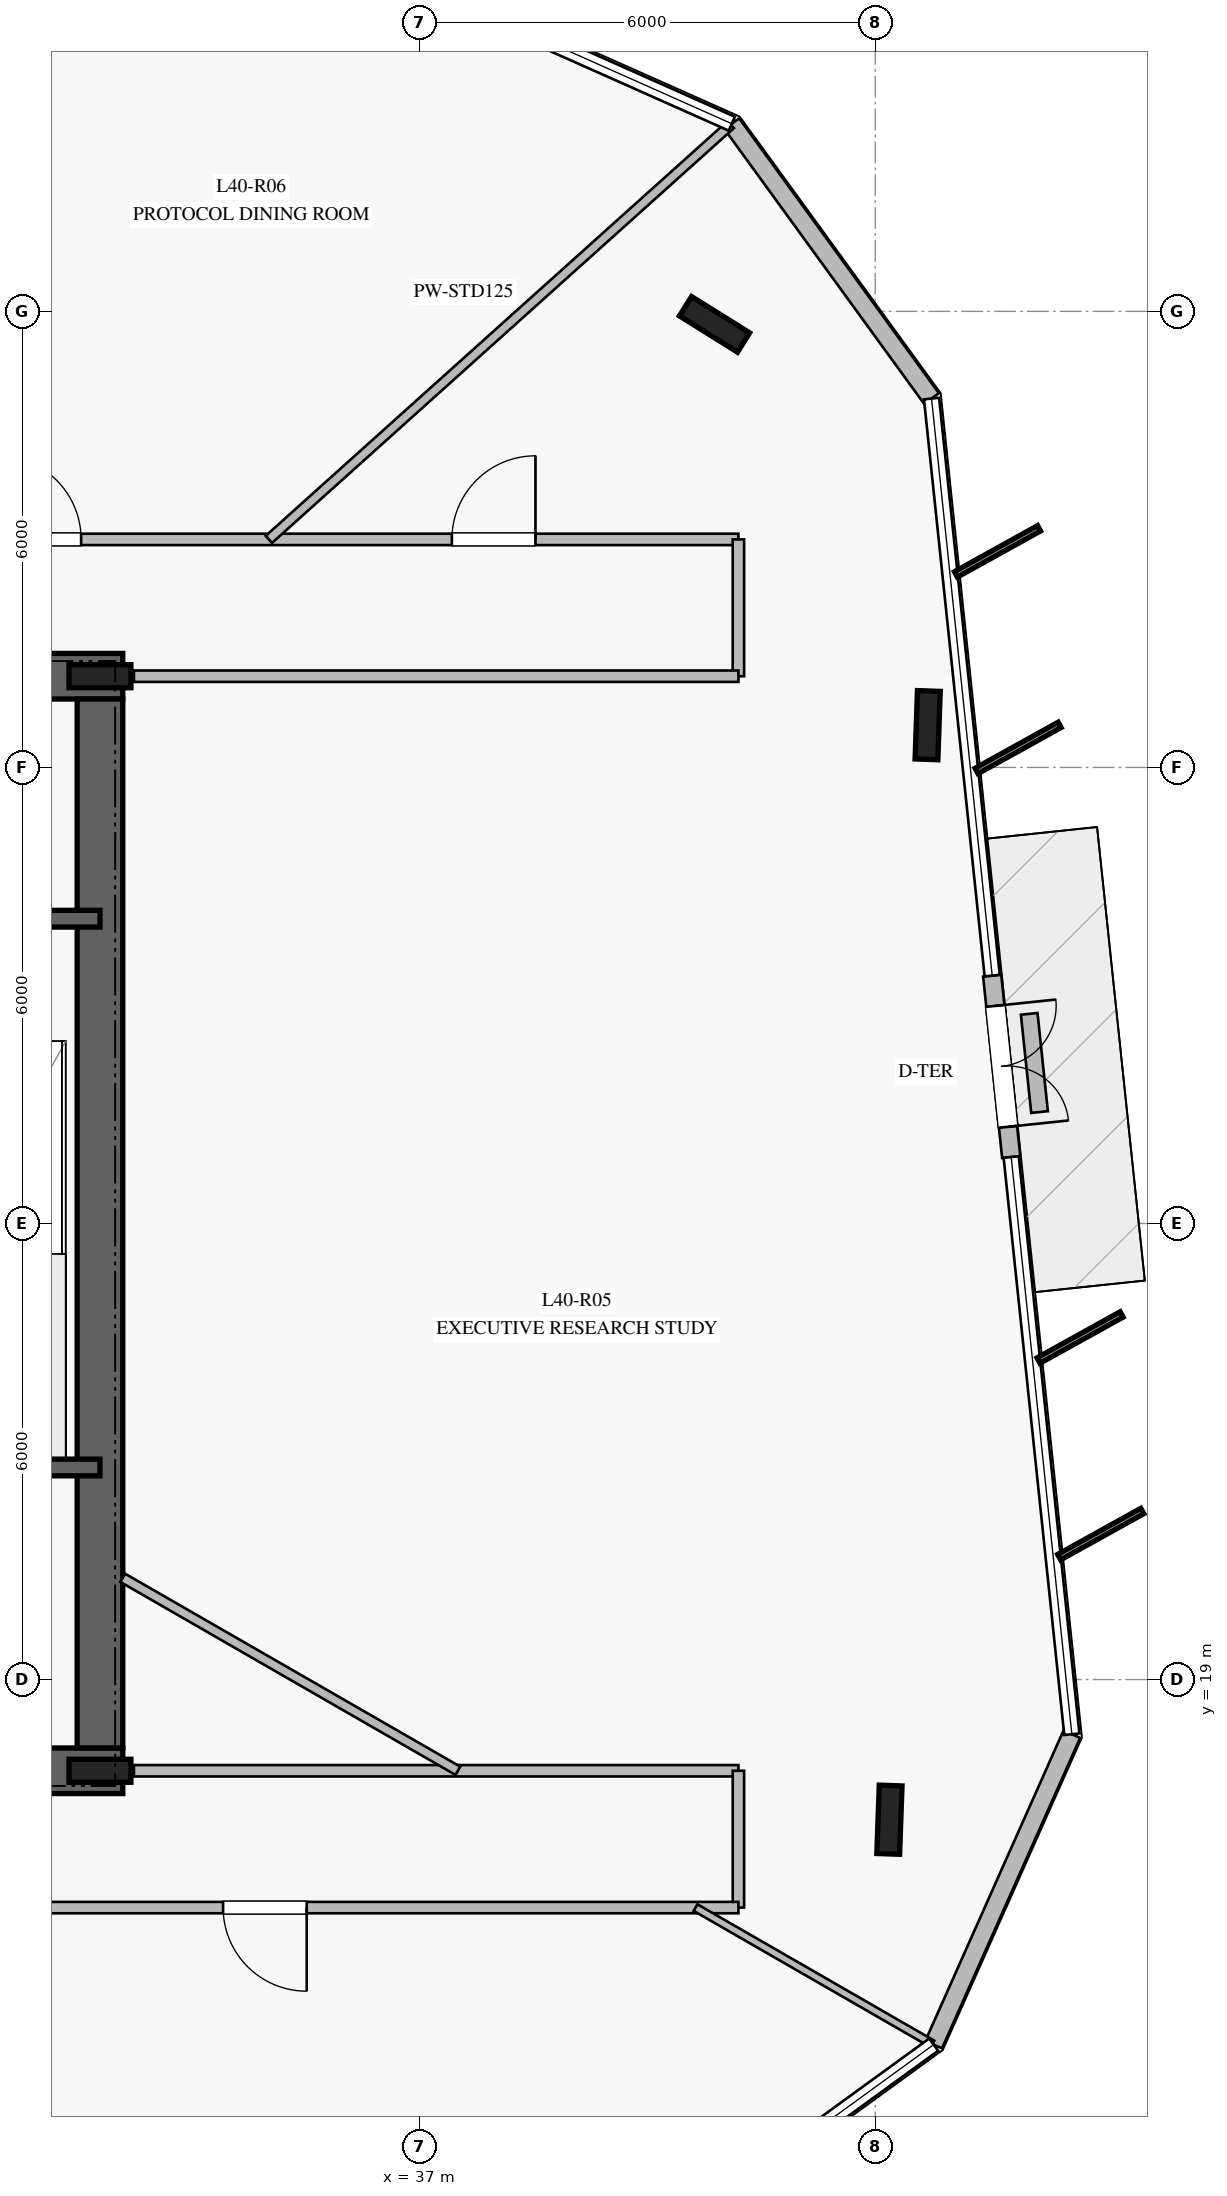
"""IFC4 building model, lengths in metres.
Left out: names, types, materials, properties, quantities, classifications, styles, units other than length and angle.
Written with IfcOpenShell. Run it as: python <this file> out.ifc"""

import sys

from ifc_helpers import new_model, si_unit, direction, frame, frame_2d, origin, origin_2d, place, context, subcontext, project, spatial, rectangle, i_section, extrude, element, fill, save


model = new_model("IFC4")
c1 = context("Model", 3, precision=1e-05, world=origin(), true_north=direction((0.0, 1.0)))
c2 = subcontext(c1, "Body", "Model", "MODEL_VIEW")
j1 = project(units=[si_unit("LENGTHUNIT", "METRE"), si_unit("PLANEANGLEUNIT", "RADIAN")], contexts=[c1])
p1 = place(None, origin())
s1 = spatial("IfcSite", under=j1, at=p1, CompositionType="ELEMENT")
p2 = place(p1, origin())
s2 = spatial("IfcBuilding", under=s1, at=p2, CompositionType="ELEMENT")
p3 = place(p2, frame((0.0, 0.0, 166.4)))
s3 = spatial("IfcBuildingStorey", under=s2, at=p3, CompositionType="ELEMENT", Elevation=166.4)
p4 = place(p3, frame((16.9, 17.8, 0.0), z_axis=(0.0, 0.0, 1.0), x_axis=(1.0, 0.0, 0.0)))
e1 = element("IfcWall", 1, at=p4, inside=s3, PredefinedType="SHEAR", context=c2, shape_type="SweptSolid", body=[
    extrude(rectangle(XDim=16.2, YDim=0.6, at=frame_2d((8.1, 0.0))), origin(), (0.0, 0.0, 1.0), 3.7),
])
p5 = place(p4, frame((5.05, 0.0, 0.0)))
e2 = element("IfcOpeningElement", 2, at=p5, cuts=e1, PredefinedType="OPENING", context=c2, shape_type="SweptSolid", body=[
    extrude(rectangle(XDim=1.2, YDim=2.25, at=frame_2d((0.6, 1.125))), frame((0.0, 0.31, 0.0), z_axis=(0.0, -1.0, 0.0), x_axis=(1.0, 0.0, 0.0)), (0.0, 0.0, 1.0), 0.62),
])
p6 = place(p4, frame((14.0, 0.0, 0.0)))
e3 = element("IfcOpeningElement", 3, at=p6, cuts=e1, PredefinedType="OPENING", context=c2, shape_type="SweptSolid", body=[
    extrude(rectangle(XDim=0.9, YDim=2.1, at=frame_2d((0.45, 1.05))), frame((0.0, 0.31, 0.0), z_axis=(0.0, -1.0, 0.0), x_axis=(1.0, 0.0, 0.0)), (0.0, 0.0, 1.0), 0.62),
])
p7 = place(p4, frame((9.875, 0.0, 0.0)))
e4 = element("IfcOpeningElement", 4, at=p7, cuts=e1, PredefinedType="OPENING", context=c2, shape_type="SweptSolid", body=[
    extrude(rectangle(XDim=1.1, YDim=2.2, at=frame_2d((0.55, 1.1))), frame((0.0, 0.31, 0.0), z_axis=(0.0, -1.0, 0.0), x_axis=(1.0, 0.0, 0.0)), (0.0, 0.0, 1.0), 0.62),
])
p8 = place(p3, frame((33.1, 32.2, 0.0), z_axis=(0.0, 0.0, 1.0), x_axis=(-1.0, 0.0, 0.0)))
e5 = element("IfcWall", 5, at=p8, inside=s3, PredefinedType="SHEAR", context=c2, shape_type="SweptSolid", body=[
    extrude(rectangle(XDim=16.2, YDim=0.6, at=frame_2d((8.1, 0.0))), origin(), (0.0, 0.0, 1.0), 3.7),
])
p9 = place(p8, frame((5.05, 0.0, 0.0)))
e6 = element("IfcOpeningElement", 6, at=p9, cuts=e5, PredefinedType="OPENING", context=c2, shape_type="SweptSolid", body=[
    extrude(rectangle(XDim=1.2, YDim=2.25, at=frame_2d((0.6, 1.125))), frame((0.0, 0.31, 0.0), z_axis=(0.0, -1.0, 0.0), x_axis=(1.0, 0.0, 0.0)), (0.0, 0.0, 1.0), 0.62),
])
p10 = place(p8, frame((11.85, 0.0, 0.0)))
e7 = element("IfcOpeningElement", 7, at=p10, cuts=e5, PredefinedType="OPENING", context=c2, shape_type="SweptSolid", body=[
    extrude(rectangle(XDim=1.1, YDim=2.2, at=frame_2d((0.55, 1.1))), frame((0.0, 0.31, 0.0), z_axis=(0.0, -1.0, 0.0), x_axis=(1.0, 0.0, 0.0)), (0.0, 0.0, 1.0), 0.62),
])
p11 = place(p8, frame((9.875, 0.0, 0.0)))
e8 = element("IfcOpeningElement", 8, at=p11, cuts=e5, PredefinedType="OPENING", context=c2, shape_type="SweptSolid", body=[
    extrude(rectangle(XDim=1.1, YDim=2.2, at=frame_2d((0.55, 1.1))), frame((0.0, 0.31, 0.0), z_axis=(0.0, -1.0, 0.0), x_axis=(1.0, 0.0, 0.0)), (0.0, 0.0, 1.0), 0.62),
])
p12 = place(p8, frame((7.9, 0.0, 0.0)))
e9 = element("IfcOpeningElement", 9, at=p12, cuts=e5, PredefinedType="OPENING", context=c2, shape_type="SweptSolid", body=[
    extrude(rectangle(XDim=1.1, YDim=2.2, at=frame_2d((0.55, 1.1))), frame((0.0, 0.31, 0.0), z_axis=(0.0, -1.0, 0.0), x_axis=(1.0, 0.0, 0.0)), (0.0, 0.0, 1.0), 0.62),
])
p13 = place(p3, frame((32.8, 18.1, 0.0), z_axis=(0.0, 0.0, 1.0), x_axis=(0.0, 1.0, 0.0)))
e10 = element("IfcWall", 10, at=p13, inside=s3, PredefinedType="SHEAR", context=c2, shape_type="SweptSolid", body=[
    extrude(rectangle(XDim=13.8, YDim=0.6, at=frame_2d((6.9, 0.0))), origin(), (0.0, 0.0, 1.0), 3.7),
])
for number, where, z_axis, x_axis in (
    (11, (32.8, 17.8, 0.0), (0.0, 0.0, 1.0), (1.0, 0.0, 0.0)),
    (12, (32.8, 32.2, 0.0), (0.0, 0.0, 1.0), (1.0, 0.0, 0.0)),
):
    element("IfcColumn", number, at=place(p3, frame(where, z_axis=z_axis, x_axis=x_axis)), inside=s3, PredefinedType="COLUMN", context=c2, shape_type="SweptSolid", body=[
        extrude(i_section(OverallWidth=0.303, OverallDepth=0.814, WebThickness=0.021, FlangeThickness=0.04, at=origin_2d()), origin(), (0.0, 0.0, 1.0), 4.0),
    ])
for number, where, z_axis, x_axis in (
    (13, (29.08, 21.79, 0.0), (0.0, 0.0, 1.0), (1.0, 0.0, 0.0)),
    (14, (29.08, 29.01, 0.0), (0.0, 0.0, 1.0), (1.0, 0.0, 0.0)),
):
    element("IfcWall", number, at=place(p3, frame(where, z_axis=z_axis, x_axis=x_axis)), inside=s3, PredefinedType="SOLIDWALL", context=c2, shape_type="SweptSolid", body=[
        extrude(rectangle(XDim=3.72, YDim=0.22, at=frame_2d((1.86, 0.0))), origin(), (0.0, 0.0, 1.0), 3.7),
    ])
for number, where, z_axis, x_axis in (
    (15, (40.886, 36.829, 0.0), (0.0, 0.0, 1.0), (-0.848, 0.53, 0.0)),
    (16, (43.187, 17.156, 0.0), (0.0, 0.0, 1.0), (0.035, 0.999, 0.0)),
    (17, (43.69, 31.556, 0.0), (0.0, 0.0, 1.0), (0.035, 0.999, 0.0)),
):
    element("IfcColumn", number, at=place(p3, frame(where, z_axis=z_axis, x_axis=x_axis)), inside=s3, PredefinedType="COLUMN", context=c2, shape_type="SweptSolid", body=[
        extrude(i_section(OverallWidth=0.3, OverallDepth=0.9, WebThickness=0.019, FlangeThickness=0.035, at=origin_2d()), origin(), (0.0, 0.0, 1.0), 4.0),
    ])
p14 = place(p3, frame((43.769, 14.197, 0.0), z_axis=(0.0, 0.0, 1.0), x_axis=(0.406655262741, 0.913581686159, 0.0)))
e18 = element("IfcWall", 18, at=p14, inside=s3, PredefinedType="STANDARD", context=c2, shape_type="SweptSolid", body=[
    extrude(rectangle(XDim=4.47, YDim=0.24, at=frame_2d((2.235, 0.0))), origin(), (0.0, 0.0, 1.0), 3.7),
])
p15 = place(p3, frame((44.789, 25.874, 0.0), z_axis=(0.0, 0.0, 1.0), x_axis=(-0.104165836226, 0.994559942167, 0.0)))
e19 = element("IfcWall", 19, at=p15, inside=s3, PredefinedType="STANDARD", context=c2, shape_type="SweptSolid", body=[
    extrude(rectangle(XDim=2.4, YDim=0.24, at=frame_2d((1.2, 0.0))), origin(), (0.0, 0.0, 1.0), 3.7),
])
p16 = place(p15, frame((0.4, 0.0, 0.0)))
e20 = element("IfcOpeningElement", 20, at=p16, cuts=e19, PredefinedType="OPENING", context=c2, shape_type="SweptSolid", body=[
    extrude(rectangle(XDim=1.6, YDim=2.25, at=frame_2d((0.8, 1.125))), frame((0.0, 0.13, 0.0), z_axis=(0.0, -1.0, 0.0), x_axis=(1.0, 0.0, 0.0)), (0.0, 0.0, 1.0), 0.26),
])
p17 = place(p3, frame((43.741, 35.853, 0.0), z_axis=(0.0, 0.0, 1.0), x_axis=(-0.587898873753, 0.80893443136, 0.0)))
e21 = element("IfcWall", 21, at=p17, inside=s3, PredefinedType="STANDARD", context=c2, shape_type="SweptSolid", body=[
    extrude(rectangle(XDim=4.47, YDim=0.24, at=frame_2d((2.235, 0.0))), origin(), (0.0, 0.0, 1.0), 3.7),
])
p18 = place(p3, frame((45.162, 26.466, 0.0), z_axis=(0.0, 0.0, 1.0), x_axis=(-0.104860863868, 0.994486902492, 0.0)))
e22 = element("IfcWall", 22, at=p18, inside=s3, PredefinedType="USERDEFINED", context=c2, shape_type="SweptSolid", body=[
    extrude(rectangle(XDim=1.299, YDim=0.22, at=frame_2d((0.649, 0.0))), origin(), (0.0, 0.0, 1.0), 0.4),
])
p19 = place(p3, frame((25.95, 34.0, 0.0), z_axis=(0.0, 0.0, 1.0), x_axis=(1.0, 0.0, 0.0)))
e23 = element("IfcWall", 23, at=p19, inside=s3, PredefinedType="PARTITIONING", context=c2, shape_type="SweptSolid", body=[
    extrude(rectangle(XDim=15.25, YDim=0.15, at=frame_2d((7.625, 0.0))), origin(), (0.0, 0.0, 1.0), 3.15),
])
p20 = place(p19, frame((11.48, 0.0, 0.0)))
e24 = element("IfcOpeningElement", 24, at=p20, cuts=e23, PredefinedType="OPENING", context=c2, shape_type="SweptSolid", body=[
    extrude(rectangle(XDim=1.1, YDim=2.2, at=frame_2d((0.55, 1.1))), frame((0.0, 0.085, 0.0), z_axis=(0.0, -1.0, 0.0), x_axis=(1.0, 0.0, 0.0)), (0.0, 0.0, 1.0), 0.17),
])
p21 = place(p19, frame((5.502, 0.0, 0.0)))
e25 = element("IfcOpeningElement", 25, at=p21, cuts=e23, PredefinedType="OPENING", context=c2, shape_type="SweptSolid", body=[
    extrude(rectangle(XDim=1.1, YDim=2.2, at=frame_2d((0.55, 1.1))), frame((0.0, 0.085, 0.0), z_axis=(0.0, -1.0, 0.0), x_axis=(1.0, 0.0, 0.0)), (0.0, 0.0, 1.0), 0.17),
])
p22 = place(p3, frame((41.2, 34.0, 0.0), z_axis=(0.0, 0.0, 1.0), x_axis=(0.0, -1.0, 0.0)))
e26 = element("IfcWall", 26, at=p22, inside=s3, PredefinedType="PARTITIONING", context=c2, shape_type="SweptSolid", body=[
    extrude(rectangle(XDim=1.8, YDim=0.15, at=frame_2d((0.9, 0.0))), origin(), (0.0, 0.0, 1.0), 3.7),
])
for number, where, z_axis, x_axis in (
    (27, (41.2, 32.2, 0.0), (0.0, 0.0, 1.0), (-1.0, 0.0, 0.0)),
    (28, (33.247, 17.8, 0.0), (0.0, 0.0, 1.0), (1.0, 0.0, 0.0)),
):
    element("IfcWall", number, at=place(p3, frame(where, z_axis=z_axis, x_axis=x_axis)), inside=s3, PredefinedType="PARTITIONING", context=c2, shape_type="SweptSolid", body=[
        extrude(rectangle(XDim=7.953, YDim=0.15, at=frame_2d((3.977, 0.0))), origin(), (0.0, 0.0, 1.0), 3.15),
    ])
p23 = place(p3, frame((41.2, 17.8, 0.0), z_axis=(0.0, 0.0, 1.0), x_axis=(0.0, -1.0, 0.0)))
e29 = element("IfcWall", 29, at=p23, inside=s3, PredefinedType="PARTITIONING", context=c2, shape_type="SweptSolid", body=[
    extrude(rectangle(XDim=1.8, YDim=0.15, at=frame_2d((0.9, 0.0))), origin(), (0.0, 0.0, 1.0), 3.15),
])
p24 = place(p3, frame((41.2, 16.0, 0.0), z_axis=(0.0, 0.0, 1.0), x_axis=(-1.0, 0.0, 0.0)))
e30 = element("IfcWall", 30, at=p24, inside=s3, PredefinedType="PARTITIONING", context=c2, shape_type="SweptSolid", body=[
    extrude(rectangle(XDim=15.25, YDim=0.15, at=frame_2d((7.625, 0.0))), origin(), (0.0, 0.0, 1.0), 3.15),
])
p25 = place(p24, frame((12.943, 0.0, 0.0)))
e31 = element("IfcOpeningElement", 31, at=p25, cuts=e30, PredefinedType="OPENING", context=c2, shape_type="SweptSolid", body=[
    extrude(rectangle(XDim=1.1, YDim=2.2, at=frame_2d((0.55, 1.1))), frame((0.0, 0.085, 0.0), z_axis=(0.0, -1.0, 0.0), x_axis=(1.0, 0.0, 0.0)), (0.0, 0.0, 1.0), 0.17),
])
p26 = place(p24, frame((5.68, 0.0, 0.0)))
e32 = element("IfcOpeningElement", 32, at=p26, cuts=e30, PredefinedType="OPENING", context=c2, shape_type="SweptSolid", body=[
    extrude(rectangle(XDim=1.1, YDim=2.2, at=frame_2d((0.55, 1.1))), frame((0.0, 0.085, 0.0), z_axis=(0.0, -1.0, 0.0), x_axis=(1.0, 0.0, 0.0)), (0.0, 0.0, 1.0), 0.17),
])
p27 = place(p3, frame((35.022, 34.0, 0.0), z_axis=(0.0, 0.0, 1.0), x_axis=(0.744048711529, 0.668125373618, 0.0)))
e33 = element("IfcWall", 33, at=p27, inside=s3, PredefinedType="PARTITIONING", context=c2, shape_type="SweptSolid", body=[
    extrude(rectangle(XDim=8.168, YDim=0.125, at=frame_2d((4.084, 0.0))), origin(), (0.0, 0.0, 1.0), 3.1),
])
p28 = place(p3, frame((29.007, 34.0, 0.0), z_axis=(0.0, 0.0, 1.0), x_axis=(0.406801666568, 0.913516504546, 0.0)))
e34 = element("IfcWall", 34, at=p28, inside=s3, PredefinedType="MOVABLE", context=c2, shape_type="SweptSolid", body=[
    extrude(rectangle(XDim=9.904, YDim=0.1, at=frame_2d((4.952, 0.0))), origin(), (0.0, 0.0, 1.0), 3.1),
])
p29 = place(p3, frame((28.896, 16.0, 0.0), z_axis=(0.0, 0.0, 1.0), x_axis=(0.397240358387, -0.917714605784, 0.0)))
e35 = element("IfcWall", 35, at=p29, inside=s3, PredefinedType="MOVABLE", context=c2, shape_type="SweptSolid", body=[
    extrude(rectangle(XDim=10.435, YDim=0.1, at=frame_2d((5.217, 0.0))), origin(), (0.0, 0.0, 1.0), 3.1),
])
p30 = place(p3, frame((33.1, 20.338, 0.0), z_axis=(0.0, 0.0, 1.0), x_axis=(0.866676533117, -0.498870511199, 0.0)))
e36 = element("IfcWall", 36, at=p30, inside=s3, PredefinedType="PARTITIONING", context=c2, shape_type="SweptSolid", body=[
    extrude(rectangle(XDim=5.087, YDim=0.125, at=frame_2d((2.543, 0.0))), origin(), (0.0, 0.0, 1.0), 3.3),
])
p31 = place(p3, frame((40.636, 16.0, 0.0), z_axis=(0.0, 0.0, 1.0), x_axis=(0.866634023406, -0.498944355088, 0.0)))
e37 = element("IfcWall", 37, at=p31, inside=s3, PredefinedType="MOVABLE", context=c2, shape_type="SweptSolid", body=[
    extrude(rectangle(XDim=3.595, YDim=0.1, at=frame_2d((1.798, 0.0))), origin(), (0.0, 0.0, 1.0), 3.1),
])
p32 = place(p16, frame((1.6, 0.0, 0.0), z_axis=(0.0, 0.0, 1.0), x_axis=(-1.0, 0.0, 0.0)))
e38 = element("IfcDoor", 38, at=p32, inside=s3, OperationType="DOUBLE_DOOR_SINGLE_SWING", PredefinedType="DOOR", context=c2, shape_type="SweptSolid", body=[
    extrude(rectangle(XDim=1.6, YDim=2.25, at=frame_2d((0.8, 1.125))), frame((0.0, 0.025, 0.0), z_axis=(0.0, -1.0, 0.0), x_axis=(1.0, 0.0, 0.0)), (0.0, 0.0, 1.0), 0.05),
])
fill(e20, e38)
p33 = place(p26, origin())
e39 = element("IfcDoor", 39, at=p33, inside=s3, OperationType="SINGLE_SWING_LEFT", PredefinedType="DOOR", context=c2, shape_type="SweptSolid", body=[
    extrude(rectangle(XDim=1.1, YDim=2.2, at=frame_2d((0.55, 1.1))), frame((0.0, 0.025, 0.0), z_axis=(0.0, -1.0, 0.0), x_axis=(1.0, 0.0, 0.0)), (0.0, 0.0, 1.0), 0.05),
])
fill(e32, e39)
p34 = place(p20, origin())
e40 = element("IfcDoor", 40, at=p34, inside=s3, OperationType="SINGLE_SWING_RIGHT", PredefinedType="DOOR", context=c2, shape_type="SweptSolid", body=[
    extrude(rectangle(XDim=1.1, YDim=2.2, at=frame_2d((0.55, 1.1))), frame((0.0, 0.025, 0.0), z_axis=(0.0, -1.0, 0.0), x_axis=(1.0, 0.0, 0.0)), (0.0, 0.0, 1.0), 0.05),
])
fill(e24, e40)
p35 = place(p21, origin())
e41 = element("IfcDoor", 41, at=p35, inside=s3, OperationType="SINGLE_SWING_LEFT", PredefinedType="DOOR", context=c2, shape_type="SweptSolid", body=[
    extrude(rectangle(XDim=1.1, YDim=2.2, at=frame_2d((0.55, 1.1))), frame((0.0, 0.025, 0.0), z_axis=(0.0, -1.0, 0.0), x_axis=(1.0, 0.0, 0.0)), (0.0, 0.0, 1.0), 0.05),
])
fill(e25, e41)
save(model, sys.argv[1])
